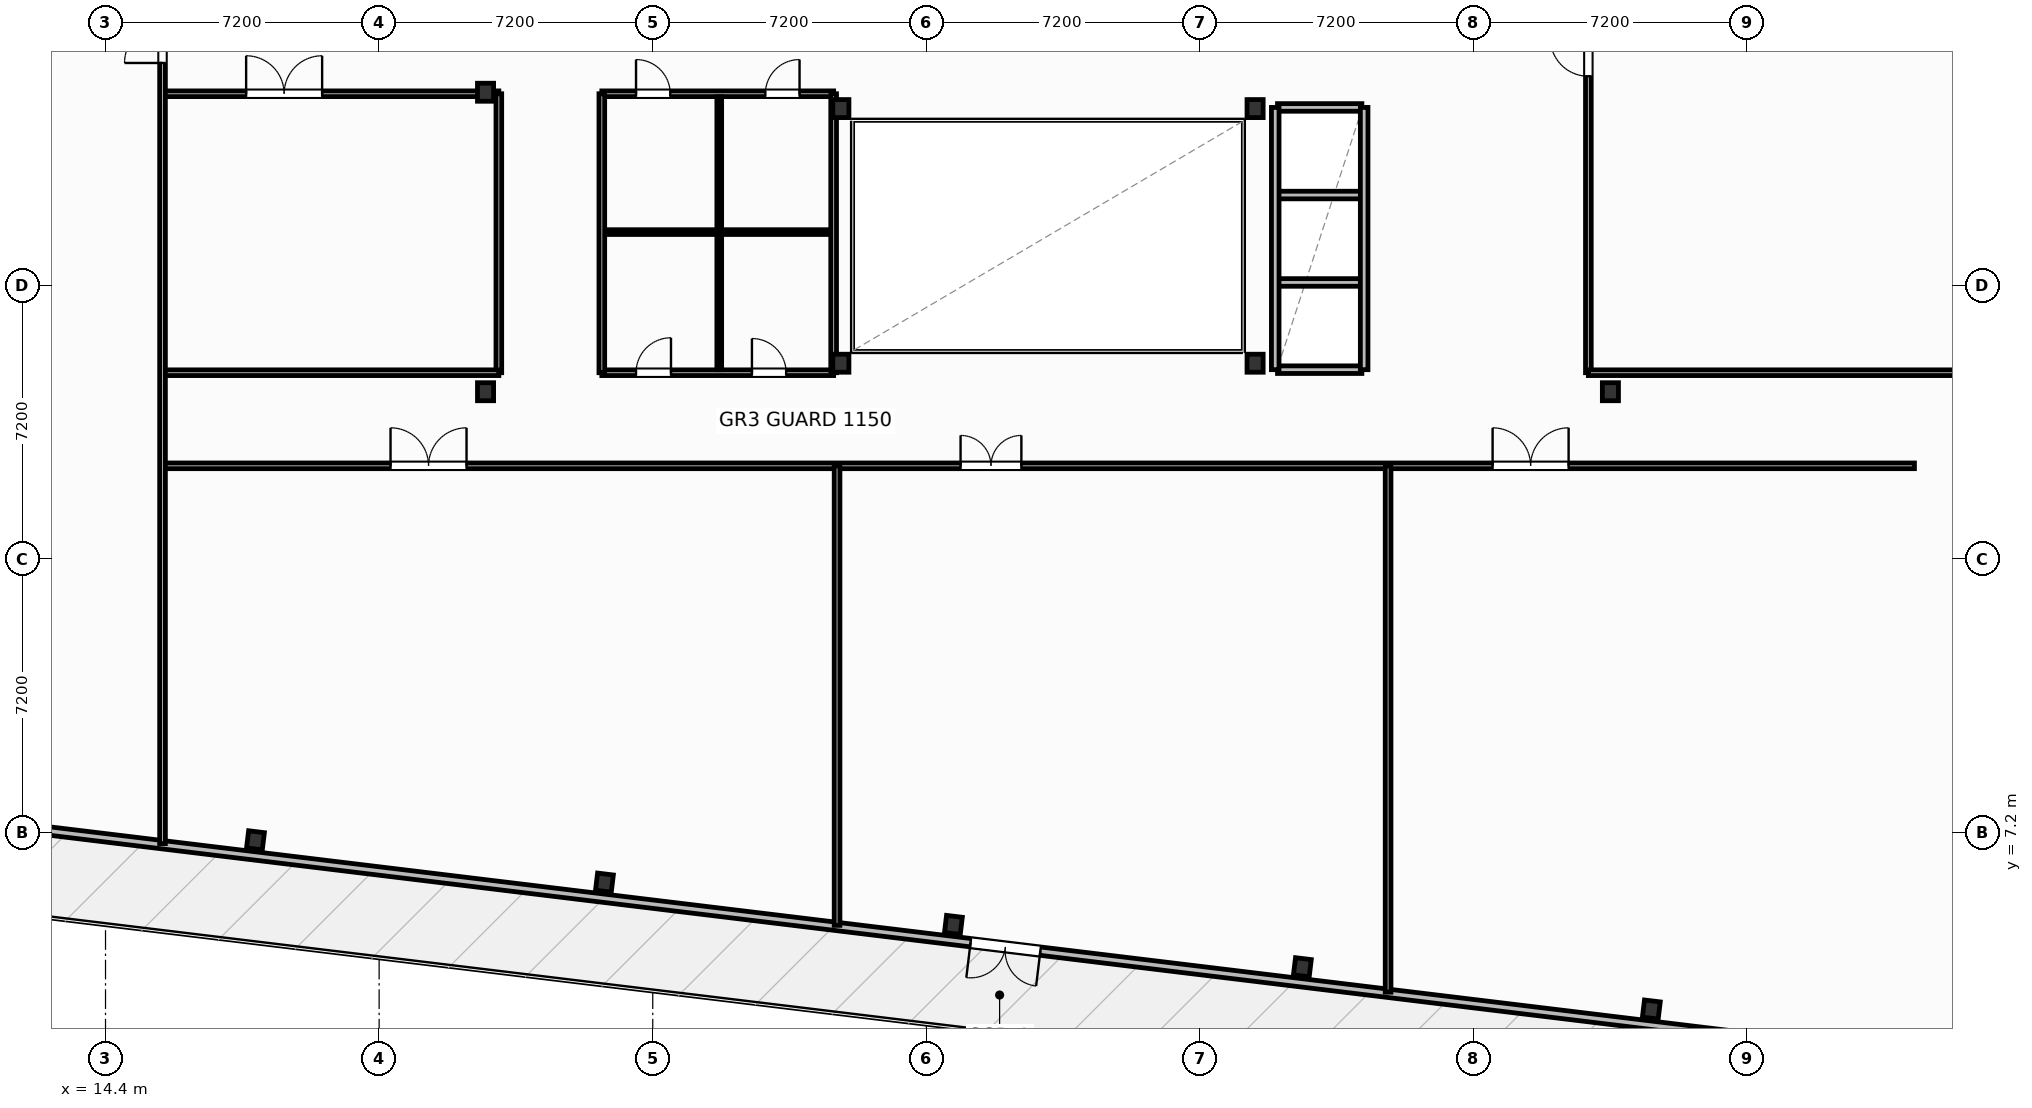
"""IFC4 building model, lengths in metres.
Left out: names, types, materials, properties, quantities, classifications, styles, units other than length and angle.
Written with IfcOpenShell. Run it as: python <this file> out.ifc"""

import sys

from ifc_helpers import new_model, si_unit, direction, frame, frame_2d, origin, origin_2d, place, context, subcontext, project, spatial, rectangle, i_section, extrude, element, fill, save


model = new_model("IFC4")
c1 = context("Model", 3, precision=1e-05, world=origin(), true_north=direction((0.0, 1.0)))
c2 = subcontext(c1, "Body", "Model", "MODEL_VIEW")
j1 = project(units=[si_unit("LENGTHUNIT", "METRE"), si_unit("PLANEANGLEUNIT", "RADIAN")], contexts=[c1])
p1 = place(None, origin())
s1 = spatial("IfcSite", under=j1, at=p1, CompositionType="ELEMENT")
p2 = place(p1, origin())
s2 = spatial("IfcBuilding", under=s1, at=p2, CompositionType="ELEMENT")
p3 = place(p2, frame((0.0, 0.0, 116.9)))
s3 = spatial("IfcBuildingStorey", under=s2, at=p3, CompositionType="ELEMENT", Elevation=116.9)
for number, where, z_axis, x_axis in (
    (1, (33.75, 19.55, 0.0), (0.0, 0.0, 1.0), (1.0, 0.0, 0.0)),
    (2, (44.65, 19.55, 0.0), (0.0, 0.0, 1.0), (1.0, 0.0, 0.0)),
    (3, (33.75, 26.25, 0.0), (0.0, 0.0, 1.0), (1.0, 0.0, 0.0)),
    (4, (44.65, 26.25, 0.0), (0.0, 0.0, 1.0), (1.0, 0.0, 0.0)),
    (5, (24.4, 18.8, 0.0), (0.0, 0.0, 1.0), (1.0, 0.0, 0.0)),
    (6, (24.4, 26.68, 0.0), (0.0, 0.0, 1.0), (1.0, 0.0, 0.0)),
    (7, (54.0, 18.8, 0.0), (0.0, 0.0, 1.0), (1.0, 0.0, 0.0)),
):
    element("IfcColumn", number, at=place(p3, frame(where, z_axis=z_axis, x_axis=x_axis)), inside=s3, PredefinedType="COLUMN", context=c2, shape_type="SweptSolid", body=[
        extrude(i_section(OverallWidth=0.424, OverallDepth=0.474, WebThickness=0.048, FlangeThickness=0.077, FilletRadius=0.025, at=origin_2d()), origin(), (0.0, 0.0, 1.0), 4.8),
    ])
for number, where, z_axis, x_axis in (
    (8, (18.346, 6.997, -0.32), (0.0, 0.0, 1.0), (0.993, -0.12, 0.0)),
    (9, (27.529, 5.884, -0.32), (0.0, 0.0, 1.0), (0.993, -0.12, 0.0)),
    (10, (36.711, 4.77, -0.32), (0.0, 0.0, 1.0), (0.993, -0.12, 0.0)),
    (11, (45.894, 3.657, -0.32), (0.0, 0.0, 1.0), (0.993, -0.12, 0.0)),
    (12, (55.077, 2.544, -0.32), (0.0, 0.0, 1.0), (0.993, -0.12, 0.0)),
):
    element("IfcColumn", number, at=place(p3, frame(where, z_axis=z_axis, x_axis=x_axis)), inside=s3, PredefinedType="COLUMN", context=c2, shape_type="SweptSolid", body=[
        extrude(i_section(OverallWidth=0.418, OverallDepth=0.455, WebThickness=0.042, FlangeThickness=0.068, FilletRadius=0.025, at=origin_2d()), origin(), (0.0, 0.0, 1.0), 5.12),
    ])
p4 = place(p3, frame((66.245, 0.777, 0.0), z_axis=(0.0, 0.0, 1.0), x_axis=(-0.992732017356, 0.120345925214, 0.0)))
e13 = element("IfcWall", 13, at=p4, inside=s3, PredefinedType="SOLIDWALL", context=c2, shape_type="SweptSolid", body=[
    extrude(rectangle(XDim=59.6, YDim=0.22, at=frame_2d((29.8, 0.0))), origin(), (0.0, 0.0, 1.0), 3.83),
])
p5 = place(p4, frame((27.446, 0.0, 0.0)))
e14 = element("IfcOpeningElement", 14, at=p5, cuts=e13, PredefinedType="OPENING", context=c2, shape_type="SweptSolid", body=[
    extrude(rectangle(XDim=1.85, YDim=2.3, at=frame_2d((0.925, 1.15))), frame((0.0, 0.12, 0.0), z_axis=(0.0, -1.0, 0.0), x_axis=(1.0, 0.0, 0.0)), (0.0, 0.0, 1.0), 0.24),
])
p6 = place(p4, frame((0.55, 0.0, 0.75)))
e15 = element("IfcOpeningElement", 15, at=p6, cuts=e13, PredefinedType="OPENING", context=c2, shape_type="SweptSolid", body=[
    extrude(rectangle(XDim=1.65, YDim=1.65, at=frame_2d((0.825, 0.825))), frame((0.0, 0.12, 0.0), z_axis=(0.0, -1.0, 0.0), x_axis=(1.0, 0.0, 0.0)), (0.0, 0.0, 1.0), 0.24),
])
p7 = place(p4, frame((57.4, 0.0, 0.75)))
e16 = element("IfcOpeningElement", 16, at=p7, cuts=e13, PredefinedType="OPENING", context=c2, shape_type="SweptSolid", body=[
    extrude(rectangle(XDim=1.65, YDim=1.65, at=frame_2d((0.825, 0.825))), frame((0.0, 0.12, 0.0), z_axis=(0.0, -1.0, 0.0), x_axis=(1.0, 0.0, 0.0)), (0.0, 0.0, 1.0), 0.24),
])
p8 = place(p3, frame((27.46, 26.64, 0.0), z_axis=(0.0, 0.0, 1.0), x_axis=(1.0, 0.0, 0.0)))
e17 = element("IfcWall", 17, at=p8, inside=s3, PredefinedType="PARTITIONING", context=c2, shape_type="SweptSolid", body=[
    extrude(rectangle(XDim=6.1, YDim=0.15, at=frame_2d((3.05, 0.0))), origin(), (0.0, 0.0, 1.0), 3.762),
])
p9 = place(p8, frame((0.9, 0.0, 0.0)))
e18 = element("IfcOpeningElement", 18, at=p9, cuts=e17, PredefinedType="OPENING", context=c2, shape_type="SweptSolid", body=[
    extrude(rectangle(XDim=0.9, YDim=2.05, at=frame_2d((0.45, 1.025))), frame((0.0, 0.085, 0.0), z_axis=(0.0, -1.0, 0.0), x_axis=(1.0, 0.0, 0.0)), (0.0, 0.0, 1.0), 0.17),
])
p10 = place(p8, frame((4.303, 0.0, 0.0)))
e19 = element("IfcOpeningElement", 19, at=p10, cuts=e17, PredefinedType="OPENING", context=c2, shape_type="SweptSolid", body=[
    extrude(rectangle(XDim=0.9, YDim=2.05, at=frame_2d((0.45, 1.025))), frame((0.0, 0.085, 0.0), z_axis=(0.0, -1.0, 0.0), x_axis=(1.0, 0.0, 0.0)), (0.0, 0.0, 1.0), 0.17),
])
p11 = place(p3, frame((27.46, 19.3, 0.0), z_axis=(0.0, 0.0, 1.0), x_axis=(1.0, 0.0, 0.0)))
e20 = element("IfcWall", 20, at=p11, inside=s3, PredefinedType="PARTITIONING", context=c2, shape_type="SweptSolid", body=[
    extrude(rectangle(XDim=6.1, YDim=0.15, at=frame_2d((3.05, 0.0))), origin(), (0.0, 0.0, 1.0), 3.762),
])
p12 = place(p11, frame((0.9, 0.0, 0.0)))
e21 = element("IfcOpeningElement", 21, at=p12, cuts=e20, PredefinedType="OPENING", context=c2, shape_type="SweptSolid", body=[
    extrude(rectangle(XDim=0.92, YDim=2.05, at=frame_2d((0.46, 1.025))), frame((0.0, 0.085, 0.0), z_axis=(0.0, -1.0, 0.0), x_axis=(1.0, 0.0, 0.0)), (0.0, 0.0, 1.0), 0.17),
])
p13 = place(p11, frame((3.95, 0.0, 0.0)))
e22 = element("IfcOpeningElement", 22, at=p13, cuts=e20, PredefinedType="OPENING", context=c2, shape_type="SweptSolid", body=[
    extrude(rectangle(XDim=0.9, YDim=2.05, at=frame_2d((0.45, 1.025))), frame((0.0, 0.085, 0.0), z_axis=(0.0, -1.0, 0.0), x_axis=(1.0, 0.0, 0.0)), (0.0, 0.0, 1.0), 0.17),
])
p14 = place(p3, frame((30.55, 19.38, 0.0), z_axis=(0.0, 0.0, 1.0), x_axis=(0.0, 1.0, 0.0)))
e23 = element("IfcWall", 23, at=p14, inside=s3, PredefinedType="PARTITIONING", context=c2, shape_type="SweptSolid", body=[
    extrude(rectangle(XDim=7.18, YDim=0.125, at=frame_2d((3.59, 0.0))), origin(), (0.0, 0.0, 1.0), 4.55),
])
p15 = place(p3, frame((27.52, 23.0, 0.0), z_axis=(0.0, 0.0, 1.0), x_axis=(1.0, 0.0, 0.0)))
e24 = element("IfcWall", 24, at=p15, inside=s3, PredefinedType="PARTITIONING", context=c2, shape_type="SweptSolid", body=[
    extrude(rectangle(XDim=6.0, YDim=0.125, at=frame_2d((3.0, 0.0))), origin(), (0.0, 0.0, 1.0), 4.55),
])
p16 = place(p3, frame((27.46, 19.3, 0.0), z_axis=(0.0, 0.0, 1.0), x_axis=(0.0, 1.0, 0.0)))
e25 = element("IfcWall", 25, at=p16, inside=s3, PredefinedType="PARTITIONING", context=c2, shape_type="SweptSolid", body=[
    extrude(rectangle(XDim=7.34, YDim=0.15, at=frame_2d((3.67, 0.0))), origin(), (0.0, 0.0, 1.0), 4.55),
])
p17 = place(p3, frame((33.56, 19.3, 0.0), z_axis=(0.0, 0.0, 1.0), x_axis=(0.0, 1.0, 0.0)))
e26 = element("IfcWall", 26, at=p17, inside=s3, PredefinedType="PARTITIONING", context=c2, shape_type="SweptSolid", body=[
    extrude(rectangle(XDim=7.34, YDim=0.15, at=frame_2d((3.67, 0.0))), origin(), (0.0, 0.0, 1.0), 3.924),
])
p18 = place(p3, frame((15.9, 16.85, 0.0), z_axis=(0.0, 0.0, 1.0), x_axis=(1.0, 0.0, 0.0)))
e27 = element("IfcWall", 27, at=p18, inside=s3, PredefinedType="PARTITIONING", context=c2, shape_type="SweptSolid", body=[
    extrude(rectangle(XDim=46.1, YDim=0.15, at=frame_2d((23.05, 0.0))), origin(), (0.0, 0.0, 1.0), 4.55),
])
p19 = place(p18, frame((6.0, 0.0, 0.0)))
e28 = element("IfcOpeningElement", 28, at=p19, cuts=e27, PredefinedType="OPENING", context=c2, shape_type="SweptSolid", body=[
    extrude(rectangle(XDim=2.0, YDim=2.05, at=frame_2d((1.0, 1.025))), frame((0.0, 0.085, 0.0), z_axis=(0.0, -1.0, 0.0), x_axis=(1.0, 0.0, 0.0)), (0.0, 0.0, 1.0), 0.17),
])
p20 = place(p18, frame((21.0, 0.0, 0.0)))
e29 = element("IfcOpeningElement", 29, at=p20, cuts=e27, PredefinedType="OPENING", context=c2, shape_type="SweptSolid", body=[
    extrude(rectangle(XDim=1.6, YDim=2.05, at=frame_2d((0.8, 1.025))), frame((0.0, 0.085, 0.0), z_axis=(0.0, -1.0, 0.0), x_axis=(1.0, 0.0, 0.0)), (0.0, 0.0, 1.0), 0.17),
])
p21 = place(p18, frame((35.0, 0.0, 0.0)))
e30 = element("IfcOpeningElement", 30, at=p21, cuts=e27, PredefinedType="OPENING", context=c2, shape_type="SweptSolid", body=[
    extrude(rectangle(XDim=2.0, YDim=2.05, at=frame_2d((1.0, 1.025))), frame((0.0, 0.085, 0.0), z_axis=(0.0, -1.0, 0.0), x_axis=(1.0, 0.0, 0.0)), (0.0, 0.0, 1.0), 0.17),
])
p22 = place(p3, frame((33.65, 4.759, 0.0), z_axis=(0.0, 0.0, 1.0), x_axis=(0.0, 1.0, 0.0)))
e31 = element("IfcWall", 31, at=p22, inside=s3, PredefinedType="PARTITIONING", context=c2, shape_type="SweptSolid", body=[
    extrude(rectangle(XDim=12.092, YDim=0.15, at=frame_2d((6.046, 0.0))), origin(), (0.0, 0.0, 1.0), 4.55),
])
p23 = place(p3, frame((48.15, 3.001, 0.0), z_axis=(0.0, 0.0, 1.0), x_axis=(0.0, 1.0, 0.0)))
e32 = element("IfcWall", 32, at=p23, inside=s3, PredefinedType="PARTITIONING", context=c2, shape_type="SweptSolid", body=[
    extrude(rectangle(XDim=13.849, YDim=0.15, at=frame_2d((6.925, 0.0))), origin(), (0.0, 0.0, 1.0), 4.55),
])
p24 = place(p3, frame((15.9, 26.64, 0.0), z_axis=(0.0, 0.0, 1.0), x_axis=(1.0, 0.0, 0.0)))
e33 = element("IfcWall", 33, at=p24, inside=s3, PredefinedType="PARTITIONING", context=c2, shape_type="SweptSolid", body=[
    extrude(rectangle(XDim=8.85, YDim=0.15, at=frame_2d((4.425, 0.0))), origin(), (0.0, 0.0, 1.0), 3.762),
])
p25 = place(p24, frame((2.2, 0.0, 0.0)))
e34 = element("IfcOpeningElement", 34, at=p25, cuts=e33, PredefinedType="OPENING", context=c2, shape_type="SweptSolid", body=[
    extrude(rectangle(XDim=2.0, YDim=2.05, at=frame_2d((1.0, 1.025))), frame((0.0, 0.085, 0.0), z_axis=(0.0, -1.0, 0.0), x_axis=(1.0, 0.0, 0.0)), (0.0, 0.0, 1.0), 0.17),
])
p26 = place(p3, frame((24.75, 19.3, 0.0), z_axis=(0.0, 0.0, 1.0), x_axis=(0.0, 1.0, 0.0)))
e35 = element("IfcWall", 35, at=p26, inside=s3, PredefinedType="PARTITIONING", context=c2, shape_type="SweptSolid", body=[
    extrude(rectangle(XDim=7.34, YDim=0.15, at=frame_2d((3.67, 0.0))), origin(), (0.0, 0.0, 1.0), 4.55),
])
p27 = place(p3, frame((15.9, 19.3, 0.0), z_axis=(0.0, 0.0, 1.0), x_axis=(1.0, 0.0, 0.0)))
e36 = element("IfcWall", 36, at=p27, inside=s3, PredefinedType="PARTITIONING", context=c2, shape_type="SweptSolid", body=[
    extrude(rectangle(XDim=8.85, YDim=0.15, at=frame_2d((4.425, 0.0))), origin(), (0.0, 0.0, 1.0), 4.55),
])
p28 = place(p3, frame((15.9, 6.91, 0.0), z_axis=(0.0, 0.0, 1.0), x_axis=(0.0, 1.0, 0.0)))
e37 = element("IfcWall", 37, at=p28, inside=s3, PredefinedType="PARTITIONING", context=c2, shape_type="SweptSolid", body=[
    extrude(rectangle(XDim=32.41, YDim=0.15, at=frame_2d((16.205, 0.0))), origin(), (0.0, 0.0, 1.0), 4.55),
])
p29 = place(p28, frame((20.54, 0.0, 0.0)))
e38 = element("IfcOpeningElement", 38, at=p29, cuts=e37, PredefinedType="OPENING", context=c2, shape_type="SweptSolid", body=[
    extrude(rectangle(XDim=1.0, YDim=2.05, at=frame_2d((0.5, 1.025))), frame((0.0, 0.085, 0.0), z_axis=(0.0, -1.0, 0.0), x_axis=(1.0, 0.0, 0.0)), (0.0, 0.0, 1.0), 0.17),
])
p30 = place(p3, frame((53.42, 19.3, 0.0), z_axis=(0.0, 0.0, 1.0), x_axis=(0.0, 1.0, 0.0)))
e39 = element("IfcWall", 39, at=p30, inside=s3, PredefinedType="PARTITIONING", context=c2, shape_type="SweptSolid", body=[
    extrude(rectangle(XDim=20.02, YDim=0.15, at=frame_2d((10.01, 0.0))), origin(), (0.0, 0.0, 1.0), 4.55),
])
p31 = place(p30, frame((7.8, 0.0, 0.0)))
e40 = element("IfcOpeningElement", 40, at=p31, cuts=e39, PredefinedType="OPENING", context=c2, shape_type="SweptSolid", body=[
    extrude(rectangle(XDim=1.0, YDim=2.05, at=frame_2d((0.5, 1.025))), frame((0.0, 0.085, 0.0), z_axis=(0.0, -1.0, 0.0), x_axis=(1.0, 0.0, 0.0)), (0.0, 0.0, 1.0), 0.17),
])
p32 = place(p3, frame((53.42, 19.3, 0.0), z_axis=(0.0, 0.0, 1.0), x_axis=(1.0, 0.0, 0.0)))
e41 = element("IfcWall", 41, at=p32, inside=s3, PredefinedType="PARTITIONING", context=c2, shape_type="SweptSolid", body=[
    extrude(rectangle(XDim=20.329, YDim=0.15, at=frame_2d((10.165, 0.0))), origin(), (0.0, 0.0, 1.0), 3.762),
])
for number, where, z_axis, x_axis in (
    (42, (45.24, 21.675, 0.0), (0.0, 0.0, 1.0), (1.0, 0.0, 0.0)),
    (43, (45.24, 23.975, 0.0), (0.0, 0.0, 1.0), (1.0, 0.0, 0.0)),
):
    element("IfcWall", number, at=place(p3, frame(where, z_axis=z_axis, x_axis=x_axis)), inside=s3, PredefinedType="PARTITIONING", context=c2, shape_type="SweptSolid", body=[
        extrude(rectangle(XDim=2.22, YDim=0.2, at=frame_2d((1.11, 0.0))), origin(), (0.0, 0.0, 1.0), 4.55),
    ])
p33 = place(p3, frame((45.24, 19.38, 0.0), z_axis=(0.0, 0.0, 1.0), x_axis=(1.0, 0.0, 0.0)))
e44 = element("IfcWall", 44, at=p33, inside=s3, PredefinedType="PARTITIONING", context=c2, shape_type="SweptSolid", body=[
    extrude(rectangle(XDim=2.22, YDim=0.2, at=frame_2d((1.11, 0.0))), origin(), (0.0, 0.0, 1.0), 3.762),
])
p34 = place(p3, frame((45.24, 26.28, 0.0), z_axis=(0.0, 0.0, 1.0), x_axis=(1.0, 0.0, 0.0)))
e45 = element("IfcWall", 45, at=p34, inside=s3, PredefinedType="PARTITIONING", context=c2, shape_type="SweptSolid", body=[
    extrude(rectangle(XDim=2.22, YDim=0.2, at=frame_2d((1.11, 0.0))), origin(), (0.0, 0.0, 1.0), 4.55),
])
for number, where, z_axis, x_axis in (
    (46, (45.18, 19.38, 0.0), (0.0, 0.0, 1.0), (0.0, 1.0, 0.0)),
    (47, (47.52, 19.38, 0.0), (0.0, 0.0, 1.0), (0.0, 1.0, 0.0)),
):
    element("IfcWall", number, at=place(p3, frame(where, z_axis=z_axis, x_axis=x_axis)), inside=s3, PredefinedType="PARTITIONING", context=c2, shape_type="SweptSolid", body=[
        extrude(rectangle(XDim=6.9, YDim=0.2, at=frame_2d((3.45, 0.0))), origin(), (0.0, 0.0, 1.0), 4.55),
    ])
p35 = place(p5, origin())
e48 = element("IfcDoor", 48, at=p35, inside=s3, OperationType="DOUBLE_DOOR_SINGLE_SWING", PredefinedType="DOOR", context=c2, shape_type="SweptSolid", body=[
    extrude(rectangle(XDim=1.85, YDim=2.3, at=frame_2d((0.925, 1.15))), frame((0.0, 0.025, 0.0), z_axis=(0.0, -1.0, 0.0), x_axis=(1.0, 0.0, 0.0)), (0.0, 0.0, 1.0), 0.05),
])
fill(e14, e48)
p36 = place(p9, origin())
e49 = element("IfcDoor", 49, at=p36, inside=s3, OperationType="SINGLE_SWING_LEFT", PredefinedType="DOOR", context=c2, shape_type="SweptSolid", body=[
    extrude(rectangle(XDim=0.9, YDim=2.05, at=frame_2d((0.45, 1.025))), frame((0.0, 0.025, 0.0), z_axis=(0.0, -1.0, 0.0), x_axis=(1.0, 0.0, 0.0)), (0.0, 0.0, 1.0), 0.05),
])
fill(e18, e49)
p37 = place(p10, origin())
e50 = element("IfcDoor", 50, at=p37, inside=s3, OperationType="SINGLE_SWING_RIGHT", PredefinedType="DOOR", context=c2, shape_type="SweptSolid", body=[
    extrude(rectangle(XDim=0.9, YDim=2.05, at=frame_2d((0.45, 1.025))), frame((0.0, 0.025, 0.0), z_axis=(0.0, -1.0, 0.0), x_axis=(1.0, 0.0, 0.0)), (0.0, 0.0, 1.0), 0.05),
])
fill(e19, e50)
p38 = place(p12, origin())
e51 = element("IfcDoor", 51, at=p38, inside=s3, OperationType="SINGLE_SWING_RIGHT", PredefinedType="DOOR", context=c2, shape_type="SweptSolid", body=[
    extrude(rectangle(XDim=0.92, YDim=2.05, at=frame_2d((0.46, 1.025))), frame((0.0, 0.025, 0.0), z_axis=(0.0, -1.0, 0.0), x_axis=(1.0, 0.0, 0.0)), (0.0, 0.0, 1.0), 0.05),
])
fill(e21, e51)
p39 = place(p13, origin())
e52 = element("IfcDoor", 52, at=p39, inside=s3, OperationType="SINGLE_SWING_LEFT", PredefinedType="DOOR", context=c2, shape_type="SweptSolid", body=[
    extrude(rectangle(XDim=0.9, YDim=2.05, at=frame_2d((0.45, 1.025))), frame((0.0, 0.025, 0.0), z_axis=(0.0, -1.0, 0.0), x_axis=(1.0, 0.0, 0.0)), (0.0, 0.0, 1.0), 0.05),
])
fill(e22, e52)
p40 = place(p19, origin())
e53 = element("IfcDoor", 53, at=p40, inside=s3, OperationType="DOUBLE_DOOR_SINGLE_SWING", PredefinedType="DOOR", context=c2, shape_type="SweptSolid", body=[
    extrude(rectangle(XDim=2.0, YDim=2.05, at=frame_2d((1.0, 1.025))), frame((0.0, 0.025, 0.0), z_axis=(0.0, -1.0, 0.0), x_axis=(1.0, 0.0, 0.0)), (0.0, 0.0, 1.0), 0.05),
])
fill(e28, e53)
p41 = place(p20, origin())
e54 = element("IfcDoor", 54, at=p41, inside=s3, OperationType="DOUBLE_DOOR_SINGLE_SWING", PredefinedType="DOOR", context=c2, shape_type="SweptSolid", body=[
    extrude(rectangle(XDim=1.6, YDim=2.05, at=frame_2d((0.8, 1.025))), frame((0.0, 0.025, 0.0), z_axis=(0.0, -1.0, 0.0), x_axis=(1.0, 0.0, 0.0)), (0.0, 0.0, 1.0), 0.05),
])
fill(e29, e54)
p42 = place(p21, origin())
e55 = element("IfcDoor", 55, at=p42, inside=s3, OperationType="DOUBLE_DOOR_SINGLE_SWING", PredefinedType="DOOR", context=c2, shape_type="SweptSolid", body=[
    extrude(rectangle(XDim=2.0, YDim=2.05, at=frame_2d((1.0, 1.025))), frame((0.0, 0.025, 0.0), z_axis=(0.0, -1.0, 0.0), x_axis=(1.0, 0.0, 0.0)), (0.0, 0.0, 1.0), 0.05),
])
fill(e30, e55)
p43 = place(p25, origin())
e56 = element("IfcDoor", 56, at=p43, inside=s3, OperationType="DOUBLE_DOOR_SINGLE_SWING", PredefinedType="DOOR", context=c2, shape_type="SweptSolid", body=[
    extrude(rectangle(XDim=2.0, YDim=2.05, at=frame_2d((1.0, 1.025))), frame((0.0, 0.025, 0.0), z_axis=(0.0, -1.0, 0.0), x_axis=(1.0, 0.0, 0.0)), (0.0, 0.0, 1.0), 0.05),
])
fill(e34, e56)
p44 = place(p29, origin())
e57 = element("IfcDoor", 57, at=p44, inside=s3, OperationType="SINGLE_SWING_LEFT", PredefinedType="DOOR", context=c2, shape_type="SweptSolid", body=[
    extrude(rectangle(XDim=1.0, YDim=2.05, at=frame_2d((0.5, 1.025))), frame((0.0, 0.025, 0.0), z_axis=(0.0, -1.0, 0.0), x_axis=(1.0, 0.0, 0.0)), (0.0, 0.0, 1.0), 0.05),
])
fill(e38, e57)
p45 = place(p31, origin())
e58 = element("IfcDoor", 58, at=p45, inside=s3, OperationType="SINGLE_SWING_RIGHT", PredefinedType="DOOR", context=c2, shape_type="SweptSolid", body=[
    extrude(rectangle(XDim=1.0, YDim=2.05, at=frame_2d((0.5, 1.025))), frame((0.0, 0.025, 0.0), z_axis=(0.0, -1.0, 0.0), x_axis=(1.0, 0.0, 0.0)), (0.0, 0.0, 1.0), 0.05),
])
fill(e40, e58)
save(model, sys.argv[1])
